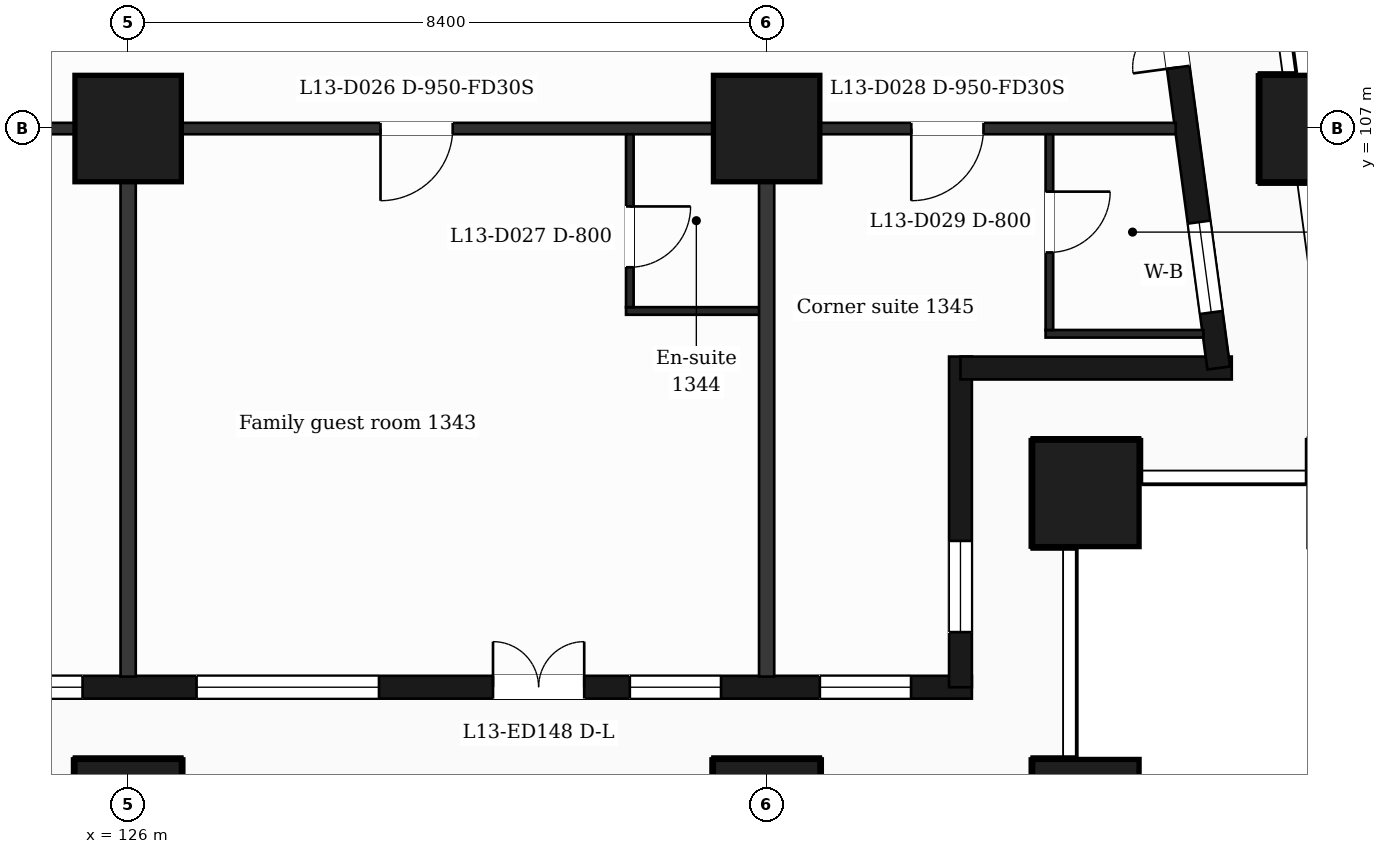
"""IFC4 building model, lengths in metres.
Left out: names, types, materials, properties, quantities, classifications, styles, units other than length and angle.
Written with IfcOpenShell. Run it as: python <this file> out.ifc"""

import sys

from ifc_helpers import new_model, si_unit, direction, frame, frame_2d, origin, origin_2d, place, context, subcontext, project, spatial, rectangle, extrude, element, fill, save


model = new_model("IFC4")
c1 = context("Model", 3, precision=1e-05, world=origin(), true_north=direction((0.0, 1.0)))
c2 = subcontext(c1, "Body", "Model", "MODEL_VIEW")
j1 = project(units=[si_unit("LENGTHUNIT", "METRE"), si_unit("PLANEANGLEUNIT", "RADIAN")], contexts=[c1])
p1 = place(None, origin())
s1 = spatial("IfcSite", under=j1, at=p1, CompositionType="ELEMENT")
p2 = place(p1, origin())
s2 = spatial("IfcBuilding", under=s1, at=p2, CompositionType="ELEMENT")
p3 = place(p2, frame((0.0, 0.0, 63.5)))
s3 = spatial("IfcBuildingStorey", under=s2, at=p3, CompositionType="ELEMENT", Elevation=63.5)
for number, where, z_axis, x_axis in (
    (1, (126.0, 98.0, 0.0), (0.0, 0.0, 1.0), (1.0, 0.0, 0.0)),
    (2, (134.4, 98.0, 0.0), (0.0, 0.0, 1.0), (1.0, 0.0, 0.0)),
    (3, (138.6, 98.0, 0.0), (0.0, 0.0, 1.0), (1.0, 0.0, 0.0)),
    (4, (138.6, 102.2, 0.0), (0.0, 0.0, 1.0), (1.0, 0.0, 0.0)),
    (5, (126.0, 107.0, 0.0), (0.0, 0.0, 1.0), (1.0, 0.0, 0.0)),
    (6, (134.4, 107.0, 0.0), (0.0, 0.0, 1.0), (1.0, 0.0, 0.0)),
    (7, (141.588, 107.0, 0.0), (0.0, 0.0, 1.0), (1.0, 0.0, 0.0)),
):
    element("IfcColumn", number, at=place(p3, frame(where, z_axis=z_axis, x_axis=x_axis)), inside=s3, PredefinedType="COLUMN", context=c2, shape_type="SweptSolid", body=[
        extrude(rectangle(XDim=1.4, YDim=1.4, at=origin_2d()), origin(), (0.0, 0.0, 1.0), 3.5),
    ])
p4 = place(p3, frame((89.85, 99.65, 0.0), z_axis=(0.0, 0.0, 1.0), x_axis=(1.0, 0.0, 0.0)))
e8 = element("IfcWall", 8, at=p4, inside=s3, PredefinedType="SOLIDWALL", context=c2, shape_type="SweptSolid", body=[
    extrude(rectangle(XDim=47.25, YDim=0.3, at=frame_2d((23.625, 0.0))), origin(), (0.0, 0.0, 1.0), 3.18),
])
p5 = place(p4, frame((0.725, 0.0, 0.9)))
e9 = element("IfcOpeningElement", 9, at=p5, cuts=e8, PredefinedType="OPENING", context=c2, shape_type="SweptSolid", body=[
    extrude(rectangle(XDim=1.2, YDim=2.1, at=frame_2d((0.6, 1.05))), frame((0.0, 0.16, 0.0), z_axis=(0.0, -1.0, 0.0), x_axis=(1.0, 0.0, 0.0)), (0.0, 0.0, 1.0), 0.32),
])
p6 = place(p4, frame((3.45, 0.0, 0.9)))
e10 = element("IfcOpeningElement", 10, at=p6, cuts=e8, PredefinedType="OPENING", context=c2, shape_type="SweptSolid", body=[
    extrude(rectangle(XDim=2.4, YDim=2.1, at=frame_2d((1.2, 1.05))), frame((0.0, 0.16, 0.0), z_axis=(0.0, -1.0, 0.0), x_axis=(1.0, 0.0, 0.0)), (0.0, 0.0, 1.0), 0.32),
])
p7 = place(p4, frame((7.65, 0.0, 0.9)))
e11 = element("IfcOpeningElement", 11, at=p7, cuts=e8, PredefinedType="OPENING", context=c2, shape_type="SweptSolid", body=[
    extrude(rectangle(XDim=2.4, YDim=2.1, at=frame_2d((1.2, 1.05))), frame((0.0, 0.16, 0.0), z_axis=(0.0, -1.0, 0.0), x_axis=(1.0, 0.0, 0.0)), (0.0, 0.0, 1.0), 0.32),
])
p8 = place(p4, frame((11.85, 0.0, 0.9)))
e12 = element("IfcOpeningElement", 12, at=p8, cuts=e8, PredefinedType="OPENING", context=c2, shape_type="SweptSolid", body=[
    extrude(rectangle(XDim=2.4, YDim=2.1, at=frame_2d((1.2, 1.05))), frame((0.0, 0.16, 0.0), z_axis=(0.0, -1.0, 0.0), x_axis=(1.0, 0.0, 0.0)), (0.0, 0.0, 1.0), 0.32),
])
p9 = place(p4, frame((16.05, 0.0, 0.9)))
e13 = element("IfcOpeningElement", 13, at=p9, cuts=e8, PredefinedType="OPENING", context=c2, shape_type="SweptSolid", body=[
    extrude(rectangle(XDim=2.4, YDim=2.1, at=frame_2d((1.2, 1.05))), frame((0.0, 0.16, 0.0), z_axis=(0.0, -1.0, 0.0), x_axis=(1.0, 0.0, 0.0)), (0.0, 0.0, 1.0), 0.32),
])
p10 = place(p4, frame((20.25, 0.0, 0.9)))
e14 = element("IfcOpeningElement", 14, at=p10, cuts=e8, PredefinedType="OPENING", context=c2, shape_type="SweptSolid", body=[
    extrude(rectangle(XDim=2.4, YDim=2.1, at=frame_2d((1.2, 1.05))), frame((0.0, 0.16, 0.0), z_axis=(0.0, -1.0, 0.0), x_axis=(1.0, 0.0, 0.0)), (0.0, 0.0, 1.0), 0.32),
])
p11 = place(p4, frame((25.05, 0.0, 0.9)))
e15 = element("IfcOpeningElement", 15, at=p11, cuts=e8, PredefinedType="OPENING", context=c2, shape_type="SweptSolid", body=[
    extrude(rectangle(XDim=1.2, YDim=2.1, at=frame_2d((0.6, 1.05))), frame((0.0, 0.16, 0.0), z_axis=(0.0, -1.0, 0.0), x_axis=(1.0, 0.0, 0.0)), (0.0, 0.0, 1.0), 0.32),
])
p12 = place(p4, frame((29.25, 0.0, 0.9)))
e16 = element("IfcOpeningElement", 16, at=p12, cuts=e8, PredefinedType="OPENING", context=c2, shape_type="SweptSolid", body=[
    extrude(rectangle(XDim=1.2, YDim=2.1, at=frame_2d((0.6, 1.05))), frame((0.0, 0.16, 0.0), z_axis=(0.0, -1.0, 0.0), x_axis=(1.0, 0.0, 0.0)), (0.0, 0.0, 1.0), 0.32),
])
p13 = place(p4, frame((32.55, 0.0, 0.0)))
e17 = element("IfcOpeningElement", 17, at=p13, cuts=e8, PredefinedType="OPENING", context=c2, shape_type="SweptSolid", body=[
    extrude(rectangle(XDim=1.2, YDim=2.4, at=frame_2d((0.6, 1.2))), frame((0.0, 0.16, 0.0), z_axis=(0.0, -1.0, 0.0), x_axis=(1.0, 0.0, 0.0)), (0.0, 0.0, 1.0), 0.32),
])
p14 = place(p4, frame((34.35, 0.0, 0.9)))
e18 = element("IfcOpeningElement", 18, at=p14, cuts=e8, PredefinedType="OPENING", context=c2, shape_type="SweptSolid", body=[
    extrude(rectangle(XDim=1.2, YDim=2.1, at=frame_2d((0.6, 1.05))), frame((0.0, 0.16, 0.0), z_axis=(0.0, -1.0, 0.0), x_axis=(1.0, 0.0, 0.0)), (0.0, 0.0, 1.0), 0.32),
])
p15 = place(p4, frame((37.05, 0.0, 0.9)))
e19 = element("IfcOpeningElement", 19, at=p15, cuts=e8, PredefinedType="OPENING", context=c2, shape_type="SweptSolid", body=[
    extrude(rectangle(XDim=2.4, YDim=2.1, at=frame_2d((1.2, 1.05))), frame((0.0, 0.16, 0.0), z_axis=(0.0, -1.0, 0.0), x_axis=(1.0, 0.0, 0.0)), (0.0, 0.0, 1.0), 0.32),
])
p16 = place(p4, frame((40.95, 0.0, 0.0)))
e20 = element("IfcOpeningElement", 20, at=p16, cuts=e8, PredefinedType="OPENING", context=c2, shape_type="SweptSolid", body=[
    extrude(rectangle(XDim=1.2, YDim=2.4, at=frame_2d((0.6, 1.2))), frame((0.0, 0.16, 0.0), z_axis=(0.0, -1.0, 0.0), x_axis=(1.0, 0.0, 0.0)), (0.0, 0.0, 1.0), 0.32),
])
p17 = place(p4, frame((42.75, 0.0, 0.9)))
e21 = element("IfcOpeningElement", 21, at=p17, cuts=e8, PredefinedType="OPENING", context=c2, shape_type="SweptSolid", body=[
    extrude(rectangle(XDim=1.2, YDim=2.1, at=frame_2d((0.6, 1.05))), frame((0.0, 0.16, 0.0), z_axis=(0.0, -1.0, 0.0), x_axis=(1.0, 0.0, 0.0)), (0.0, 0.0, 1.0), 0.32),
])
p18 = place(p4, frame((45.25, 0.0, 0.9)))
e22 = element("IfcOpeningElement", 22, at=p18, cuts=e8, PredefinedType="OPENING", context=c2, shape_type="SweptSolid", body=[
    extrude(rectangle(XDim=1.2, YDim=2.1, at=frame_2d((0.6, 1.05))), frame((0.0, 0.16, 0.0), z_axis=(0.0, -1.0, 0.0), x_axis=(1.0, 0.0, 0.0)), (0.0, 0.0, 1.0), 0.32),
])
p19 = place(p3, frame((136.95, 99.65, 0.0), z_axis=(0.0, 0.0, 1.0), x_axis=(0.0, 1.0, 0.0)))
e23 = element("IfcWall", 23, at=p19, inside=s3, PredefinedType="SOLIDWALL", context=c2, shape_type="SweptSolid", body=[
    extrude(rectangle(XDim=4.35, YDim=0.3, at=frame_2d((2.175, 0.0))), origin(), (0.0, 0.0, 1.0), 3.18),
])
p20 = place(p19, frame((0.725, 0.0, 0.9)))
e24 = element("IfcOpeningElement", 24, at=p20, cuts=e23, PredefinedType="OPENING", context=c2, shape_type="SweptSolid", body=[
    extrude(rectangle(XDim=1.2, YDim=2.1, at=frame_2d((0.6, 1.05))), frame((0.0, 0.16, 0.0), z_axis=(0.0, -1.0, 0.0), x_axis=(1.0, 0.0, 0.0)), (0.0, 0.0, 1.0), 0.32),
])
p21 = place(p3, frame((136.95, 103.85, 0.0), z_axis=(0.0, 0.0, 1.0), x_axis=(1.0, 0.0, 0.0)))
e25 = element("IfcWall", 25, at=p21, inside=s3, PredefinedType="SOLIDWALL", context=c2, shape_type="SweptSolid", body=[
    extrude(rectangle(XDim=3.569, YDim=0.3, at=frame_2d((1.785, 0.0))), origin(), (0.0, 0.0, 1.0), 3.18),
])
p22 = place(p3, frame((140.348, 103.85, 0.0), z_axis=(0.0, 0.0, 1.0), x_axis=(-0.133431549479, 0.991058031401, 0.0)))
e26 = element("IfcWall", 26, at=p22, inside=s3, PredefinedType="SOLIDWALL", context=c2, shape_type="SweptSolid", body=[
    extrude(rectangle(XDim=6.609, YDim=0.3, at=frame_2d((3.304, 0.0))), origin(), (0.0, 0.0, 1.0), 3.18),
])
p23 = place(p22, frame((0.737, 0.0, 0.9)))
e27 = element("IfcOpeningElement", 27, at=p23, cuts=e26, PredefinedType="OPENING", context=c2, shape_type="SweptSolid", body=[
    extrude(rectangle(XDim=1.2, YDim=2.1, at=frame_2d((0.6, 1.05))), frame((0.0, 0.16, 0.0), z_axis=(0.0, -1.0, 0.0), x_axis=(1.0, 0.0, 0.0)), (0.0, 0.0, 1.0), 0.32),
])
p24 = place(p22, frame((3.991, 0.0, 0.0)))
e28 = element("IfcOpeningElement", 28, at=p24, cuts=e26, PredefinedType="OPENING", context=c2, shape_type="SweptSolid", body=[
    extrude(rectangle(XDim=1.2, YDim=2.4, at=frame_2d((0.6, 1.2))), frame((0.0, 0.16, 0.0), z_axis=(0.0, -1.0, 0.0), x_axis=(1.0, 0.0, 0.0)), (0.0, 0.0, 1.0), 0.32),
])
p25 = place(p3, frame((138.07, 104.3, 0.0), z_axis=(0.0, 0.0, 1.0), x_axis=(1.0, 0.0, 0.0)))
e29 = element("IfcWall", 29, at=p25, inside=s3, PredefinedType="PARTITIONING", context=c2, shape_type="SweptSolid", body=[
    extrude(rectangle(XDim=2.076, YDim=0.1, at=frame_2d((1.038, 0.0))), origin(), (0.0, 0.0, 1.0), 3.18),
])
p26 = place(p3, frame((132.55, 104.6, 0.0), z_axis=(0.0, 0.0, 1.0), x_axis=(1.0, 0.0, 0.0)))
e30 = element("IfcWall", 30, at=p26, inside=s3, PredefinedType="PARTITIONING", context=c2, shape_type="SweptSolid", body=[
    extrude(rectangle(XDim=1.85, YDim=0.1, at=frame_2d((0.925, 0.0))), origin(), (0.0, 0.0, 1.0), 3.18),
])
p27 = place(p3, frame((87.018, 107.0, 0.0), z_axis=(0.0, 0.0, 1.0), x_axis=(1.0, 0.0, 0.0)))
e31 = element("IfcWall", 31, at=p27, inside=s3, PredefinedType="PARTITIONING", context=c2, shape_type="SweptSolid", body=[
    extrude(rectangle(XDim=52.765, YDim=0.15, at=frame_2d((26.382, 0.0))), origin(), (0.0, 0.0, 1.0), 3.18),
])
p28 = place(p27, frame((1.032, 0.0, 0.0)))
e32 = element("IfcOpeningElement", 32, at=p28, cuts=e31, PredefinedType="OPENING", context=c2, shape_type="SweptSolid", body=[
    extrude(rectangle(XDim=0.95, YDim=2.1, at=frame_2d((0.475, 1.05))), frame((0.0, 0.085, 0.0), z_axis=(0.0, -1.0, 0.0), x_axis=(1.0, 0.0, 0.0)), (0.0, 0.0, 1.0), 0.17),
])
p29 = place(p27, frame((6.894, 0.0, 0.0)))
e33 = element("IfcOpeningElement", 33, at=p29, cuts=e31, PredefinedType="OPENING", context=c2, shape_type="SweptSolid", body=[
    extrude(rectangle(XDim=0.95, YDim=2.1, at=frame_2d((0.475, 1.05))), frame((0.0, 0.085, 0.0), z_axis=(0.0, -1.0, 0.0), x_axis=(1.0, 0.0, 0.0)), (0.0, 0.0, 1.0), 0.17),
])
p30 = place(p27, frame((17.844, 0.0, 0.0)))
e34 = element("IfcOpeningElement", 34, at=p30, cuts=e31, PredefinedType="OPENING", context=c2, shape_type="SweptSolid", body=[
    extrude(rectangle(XDim=0.95, YDim=2.1, at=frame_2d((0.475, 1.05))), frame((0.0, 0.085, 0.0), z_axis=(0.0, -1.0, 0.0), x_axis=(1.0, 0.0, 0.0)), (0.0, 0.0, 1.0), 0.17),
])
p31 = place(p27, frame((26.245, 0.0, 0.0)))
e35 = element("IfcOpeningElement", 35, at=p31, cuts=e31, PredefinedType="OPENING", context=c2, shape_type="SweptSolid", body=[
    extrude(rectangle(XDim=0.95, YDim=2.1, at=frame_2d((0.475, 1.05))), frame((0.0, 0.085, 0.0), z_axis=(0.0, -1.0, 0.0), x_axis=(1.0, 0.0, 0.0)), (0.0, 0.0, 1.0), 0.17),
])
p32 = place(p27, frame((35.822, 0.0, 0.0)))
e36 = element("IfcOpeningElement", 36, at=p32, cuts=e31, PredefinedType="OPENING", context=c2, shape_type="SweptSolid", body=[
    extrude(rectangle(XDim=0.95, YDim=2.1, at=frame_2d((0.475, 1.05))), frame((0.0, 0.085, 0.0), z_axis=(0.0, -1.0, 0.0), x_axis=(1.0, 0.0, 0.0)), (0.0, 0.0, 1.0), 0.17),
])
p33 = place(p27, frame((42.302, 0.0, 0.0)))
e37 = element("IfcOpeningElement", 37, at=p33, cuts=e31, PredefinedType="OPENING", context=c2, shape_type="SweptSolid", body=[
    extrude(rectangle(XDim=0.95, YDim=2.1, at=frame_2d((0.475, 1.05))), frame((0.0, 0.085, 0.0), z_axis=(0.0, -1.0, 0.0), x_axis=(1.0, 0.0, 0.0)), (0.0, 0.0, 1.0), 0.17),
])
p34 = place(p27, frame((49.285, 0.0, 0.0)))
e38 = element("IfcOpeningElement", 38, at=p34, cuts=e31, PredefinedType="OPENING", context=c2, shape_type="SweptSolid", body=[
    extrude(rectangle(XDim=0.95, YDim=2.1, at=frame_2d((0.475, 1.05))), frame((0.0, 0.085, 0.0), z_axis=(0.0, -1.0, 0.0), x_axis=(1.0, 0.0, 0.0)), (0.0, 0.0, 1.0), 0.17),
])
p35 = place(p3, frame((126.0, 99.79, 0.0), z_axis=(0.0, 0.0, 1.0), x_axis=(0.0, 1.0, 0.0)))
e39 = element("IfcWall", 39, at=p35, inside=s3, PredefinedType="PARTITIONING", context=c2, shape_type="SweptSolid", body=[
    extrude(rectangle(XDim=7.135, YDim=0.2, at=frame_2d((3.567, 0.0))), origin(), (0.0, 0.0, 1.0), 3.18),
])
p36 = place(p3, frame((132.6, 104.65, 0.0), z_axis=(0.0, 0.0, 1.0), x_axis=(0.0, 1.0, 0.0)))
e40 = element("IfcWall", 40, at=p36, inside=s3, PredefinedType="PARTITIONING", context=c2, shape_type="SweptSolid", body=[
    extrude(rectangle(XDim=2.275, YDim=0.1, at=frame_2d((1.138, 0.0))), origin(), (0.0, 0.0, 1.0), 3.18),
])
p37 = place(p36, frame((0.525, 0.0, 0.0)))
e41 = element("IfcOpeningElement", 41, at=p37, cuts=e40, PredefinedType="OPENING", context=c2, shape_type="SweptSolid", body=[
    extrude(rectangle(XDim=0.8, YDim=2.1, at=frame_2d((0.4, 1.05))), frame((0.0, 0.06, 0.0), z_axis=(0.0, -1.0, 0.0), x_axis=(1.0, 0.0, 0.0)), (0.0, 0.0, 1.0), 0.12),
])
p38 = place(p3, frame((134.4, 99.79, 0.0), z_axis=(0.0, 0.0, 1.0), x_axis=(0.0, 1.0, 0.0)))
e42 = element("IfcWall", 42, at=p38, inside=s3, PredefinedType="PARTITIONING", context=c2, shape_type="SweptSolid", body=[
    extrude(rectangle(XDim=7.135, YDim=0.2, at=frame_2d((3.567, 0.0))), origin(), (0.0, 0.0, 1.0), 3.18),
])
p39 = place(p3, frame((138.12, 104.35, 0.0), z_axis=(0.0, 0.0, 1.0), x_axis=(0.0, 1.0, 0.0)))
e43 = element("IfcWall", 43, at=p39, inside=s3, PredefinedType="PARTITIONING", context=c2, shape_type="SweptSolid", body=[
    extrude(rectangle(XDim=2.575, YDim=0.1, at=frame_2d((1.288, 0.0))), origin(), (0.0, 0.0, 1.0), 3.18),
])
p40 = place(p39, frame((1.02, 0.0, 0.0)))
e44 = element("IfcOpeningElement", 44, at=p40, cuts=e43, PredefinedType="OPENING", context=c2, shape_type="SweptSolid", body=[
    extrude(rectangle(XDim=0.8, YDim=2.1, at=frame_2d((0.4, 1.05))), frame((0.0, 0.06, 0.0), z_axis=(0.0, -1.0, 0.0), x_axis=(1.0, 0.0, 0.0)), (0.0, 0.0, 1.0), 0.12),
])
p41 = place(p14, origin())
e45 = element("IfcWindow", 45, at=p41, inside=s3, PartitioningType="SINGLE_PANEL", PredefinedType="WINDOW", context=c2, shape_type="SweptSolid", body=[
    extrude(rectangle(XDim=1.2, YDim=2.1, at=frame_2d((0.6, 1.05))), frame((0.0, 0.03, 0.0), z_axis=(0.0, -1.0, 0.0), x_axis=(1.0, 0.0, 0.0)), (0.0, 0.0, 1.0), 0.06),
])
fill(e18, e45)
p42 = place(p15, origin())
e46 = element("IfcWindow", 46, at=p42, inside=s3, PartitioningType="SINGLE_PANEL", PredefinedType="WINDOW", context=c2, shape_type="SweptSolid", body=[
    extrude(rectangle(XDim=2.4, YDim=2.1, at=frame_2d((1.2, 1.05))), frame((0.0, 0.03, 0.0), z_axis=(0.0, -1.0, 0.0), x_axis=(1.0, 0.0, 0.0)), (0.0, 0.0, 1.0), 0.06),
])
fill(e19, e46)
p43 = place(p16, origin())
e47 = element("IfcDoor", 47, at=p43, inside=s3, OperationType="DOUBLE_DOOR_SINGLE_SWING", PredefinedType="DOOR", context=c2, shape_type="SweptSolid", body=[
    extrude(rectangle(XDim=1.2, YDim=2.4, at=frame_2d((0.6, 1.2))), frame((0.0, 0.025, 0.0), z_axis=(0.0, -1.0, 0.0), x_axis=(1.0, 0.0, 0.0)), (0.0, 0.0, 1.0), 0.05),
])
fill(e20, e47)
p44 = place(p17, origin())
e48 = element("IfcWindow", 48, at=p44, inside=s3, PartitioningType="SINGLE_PANEL", PredefinedType="WINDOW", context=c2, shape_type="SweptSolid", body=[
    extrude(rectangle(XDim=1.2, YDim=2.1, at=frame_2d((0.6, 1.05))), frame((0.0, 0.03, 0.0), z_axis=(0.0, -1.0, 0.0), x_axis=(1.0, 0.0, 0.0)), (0.0, 0.0, 1.0), 0.06),
])
fill(e21, e48)
p45 = place(p18, origin())
e49 = element("IfcWindow", 49, at=p45, inside=s3, PartitioningType="SINGLE_PANEL", PredefinedType="WINDOW", context=c2, shape_type="SweptSolid", body=[
    extrude(rectangle(XDim=1.2, YDim=2.1, at=frame_2d((0.6, 1.05))), frame((0.0, 0.03, 0.0), z_axis=(0.0, -1.0, 0.0), x_axis=(1.0, 0.0, 0.0)), (0.0, 0.0, 1.0), 0.06),
])
fill(e22, e49)
p46 = place(p20, origin())
e50 = element("IfcWindow", 50, at=p46, inside=s3, PartitioningType="SINGLE_PANEL", PredefinedType="WINDOW", context=c2, shape_type="SweptSolid", body=[
    extrude(rectangle(XDim=1.2, YDim=2.1, at=frame_2d((0.6, 1.05))), frame((0.0, 0.03, 0.0), z_axis=(0.0, -1.0, 0.0), x_axis=(1.0, 0.0, 0.0)), (0.0, 0.0, 1.0), 0.06),
])
fill(e24, e50)
p47 = place(p23, origin())
e51 = element("IfcWindow", 51, at=p47, inside=s3, PartitioningType="SINGLE_PANEL", PredefinedType="WINDOW", context=c2, shape_type="SweptSolid", body=[
    extrude(rectangle(XDim=1.2, YDim=2.1, at=frame_2d((0.6, 1.05))), frame((0.0, 0.03, 0.0), z_axis=(0.0, -1.0, 0.0), x_axis=(1.0, 0.0, 0.0)), (0.0, 0.0, 1.0), 0.06),
])
fill(e27, e51)
p48 = place(p24, origin())
e52 = element("IfcDoor", 52, at=p48, inside=s3, OperationType="DOUBLE_DOOR_SINGLE_SWING", PredefinedType="DOOR", context=c2, shape_type="SweptSolid", body=[
    extrude(rectangle(XDim=1.2, YDim=2.4, at=frame_2d((0.6, 1.2))), frame((0.0, 0.025, 0.0), z_axis=(0.0, -1.0, 0.0), x_axis=(1.0, 0.0, 0.0)), (0.0, 0.0, 1.0), 0.05),
])
fill(e28, e52)
p49 = place(p33, origin())
e53 = element("IfcDoor", 53, at=p49, inside=s3, OperationType="SINGLE_SWING_LEFT", PredefinedType="DOOR", context=c2, shape_type="SweptSolid", body=[
    extrude(rectangle(XDim=0.95, YDim=2.1, at=frame_2d((0.475, 1.05))), frame((0.0, 0.025, 0.0), z_axis=(0.0, -1.0, 0.0), x_axis=(1.0, 0.0, 0.0)), (0.0, 0.0, 1.0), 0.05),
])
fill(e37, e53)
p50 = place(p37, origin())
e54 = element("IfcDoor", 54, at=p50, inside=s3, OperationType="SINGLE_SWING_RIGHT", PredefinedType="DOOR", context=c2, shape_type="SweptSolid", body=[
    extrude(rectangle(XDim=0.8, YDim=2.1, at=frame_2d((0.4, 1.05))), frame((0.0, 0.025, 0.0), z_axis=(0.0, -1.0, 0.0), x_axis=(1.0, 0.0, 0.0)), (0.0, 0.0, 1.0), 0.05),
])
fill(e41, e54)
p51 = place(p34, origin())
e55 = element("IfcDoor", 55, at=p51, inside=s3, OperationType="SINGLE_SWING_LEFT", PredefinedType="DOOR", context=c2, shape_type="SweptSolid", body=[
    extrude(rectangle(XDim=0.95, YDim=2.1, at=frame_2d((0.475, 1.05))), frame((0.0, 0.025, 0.0), z_axis=(0.0, -1.0, 0.0), x_axis=(1.0, 0.0, 0.0)), (0.0, 0.0, 1.0), 0.05),
])
fill(e38, e55)
p52 = place(p40, origin())
e56 = element("IfcDoor", 56, at=p52, inside=s3, OperationType="SINGLE_SWING_RIGHT", PredefinedType="DOOR", context=c2, shape_type="SweptSolid", body=[
    extrude(rectangle(XDim=0.8, YDim=2.1, at=frame_2d((0.4, 1.05))), frame((0.0, 0.025, 0.0), z_axis=(0.0, -1.0, 0.0), x_axis=(1.0, 0.0, 0.0)), (0.0, 0.0, 1.0), 0.05),
])
fill(e44, e56)
save(model, sys.argv[1])
